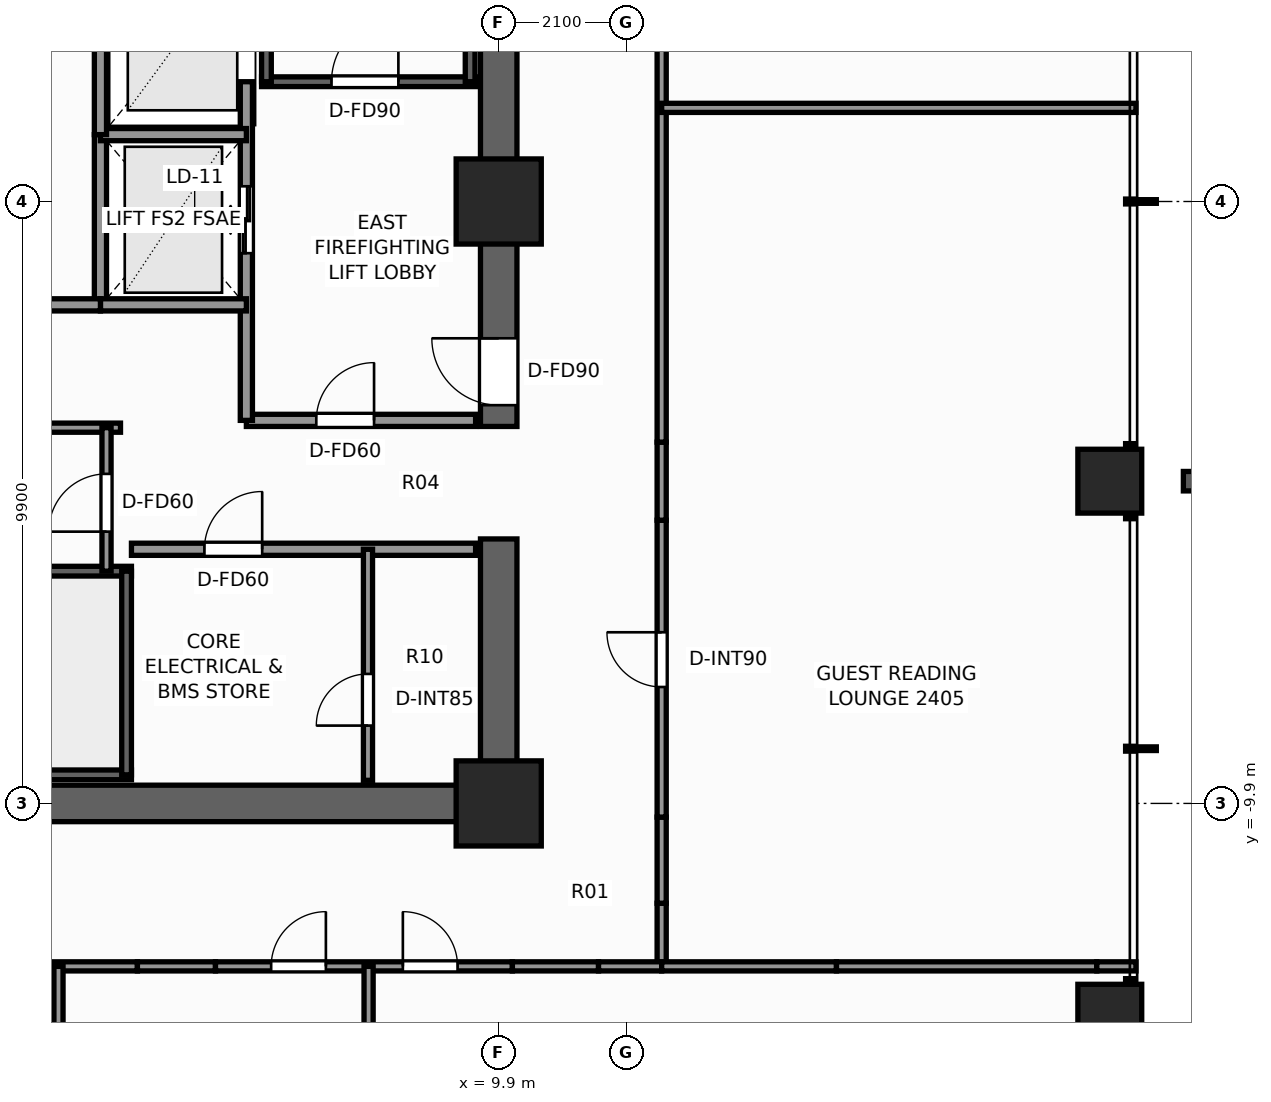
"""IFC4 building model, lengths in metres.
Left out: names, types, materials, properties, quantities, classifications, styles, units other than length and angle.
Written with IfcOpenShell. Run it as: python <this file> out.ifc"""

import sys

from ifc_helpers import new_model, si_unit, direction, frame, frame_2d, origin, origin_2d, place, context, subcontext, project, spatial, rectangle, extrude, element, fill, save


model = new_model("IFC4")
c1 = context("Model", 3, precision=1e-05, world=origin(), true_north=direction((0.0, 1.0)))
c2 = subcontext(c1, "Body", "Model", "MODEL_VIEW")
j1 = project(units=[si_unit("LENGTHUNIT", "METRE"), si_unit("PLANEANGLEUNIT", "RADIAN")], contexts=[c1])
p1 = place(None, origin())
s1 = spatial("IfcSite", under=j1, at=p1, CompositionType="ELEMENT")
p2 = place(p1, origin())
s2 = spatial("IfcBuilding", under=s1, at=p2, CompositionType="ELEMENT")
p3 = place(p2, frame((0.0, 0.0, 85.4)))
s3 = spatial("IfcBuildingStorey", under=s2, at=p3, CompositionType="ELEMENT", Elevation=85.4)
p4 = place(p3, frame((10.2, -9.9, 0.0), z_axis=(0.0, 0.0, 1.0), x_axis=(-1.0, 0.0, 0.0)))
e1 = element("IfcWall", 1, at=p4, inside=s3, PredefinedType="SHEAR", context=c2, shape_type="SweptSolid", body=[
    extrude(rectangle(XDim=12.06, YDim=0.6, at=frame_2d((6.03, 0.0))), origin(), (0.0, 0.0, 1.0), 3.3),
])
p5 = place(p3, frame((9.9, -9.6, 0.0), z_axis=(0.0, 0.0, 1.0), x_axis=(0.0, 1.0, 0.0)))
e2 = element("IfcWall", 2, at=p5, inside=s3, PredefinedType="SHEAR", context=c2, shape_type="SweptSolid", body=[
    extrude(rectangle(XDim=4.05, YDim=0.6, at=frame_2d((2.025, 0.0))), origin(), (0.0, 0.0, 1.0), 3.3),
])
p6 = place(p3, frame((9.9, -3.7, 0.0), z_axis=(0.0, 0.0, 1.0), x_axis=(0.0, 1.0, 0.0)))
e3 = element("IfcWall", 3, at=p6, inside=s3, PredefinedType="SHEAR", context=c2, shape_type="SweptSolid", body=[
    extrude(rectangle(XDim=13.3, YDim=0.6, at=frame_2d((6.65, 0.0))), origin(), (0.0, 0.0, 1.0), 3.3),
])
p7 = place(p6, frame((0.35, 0.0, 0.0)))
e4 = element("IfcOpeningElement", 4, at=p7, cuts=e3, PredefinedType="OPENING", context=c2, shape_type="SweptSolid", body=[
    extrude(rectangle(XDim=1.1, YDim=2.2, at=frame_2d((0.55, 1.1))), frame((0.0, 0.31, 0.0), z_axis=(0.0, -1.0, 0.0), x_axis=(1.0, 0.0, 0.0)), (0.0, 0.0, 1.0), 0.62),
])
for number, where, z_axis, x_axis in (
    (5, (9.9, -9.9, 0.0), (0.0, 0.0, 1.0), (1.0, 0.0, 0.0)),
    (6, (9.9, 0.0, 0.0), (0.0, 0.0, 1.0), (1.0, 0.0, 0.0)),
):
    element("IfcColumn", number, at=place(p3, frame(where, z_axis=z_axis, x_axis=x_axis)), inside=s3, PredefinedType="COLUMN", context=c2, shape_type="SweptSolid", body=[
        extrude(rectangle(XDim=1.4, YDim=1.4, at=origin_2d()), origin(), (0.0, 0.0, 1.0), 3.3),
    ])
for number, where, z_axis, x_axis in (
    (7, (19.95, -13.4, 0.0), (0.0, 0.0, 1.0), (1.0, 0.0, 0.0)),
    (8, (19.95, -4.6, 0.0), (0.0, 0.0, 1.0), (1.0, 0.0, 0.0)),
):
    element("IfcColumn", number, at=place(p3, frame(where, z_axis=z_axis, x_axis=x_axis)), inside=s3, PredefinedType="COLUMN", context=c2, shape_type="SweptSolid", body=[
        extrude(rectangle(XDim=1.05, YDim=1.05, at=origin_2d()), origin(), (0.0, 0.0, 1.0), 3.3),
    ])
p8 = place(p3, frame((6.0, 1.97, 0.0), z_axis=(0.0, 0.0, 1.0), x_axis=(1.0, 0.0, 0.0)))
e9 = element("IfcWall", 9, at=p8, inside=s3, PredefinedType="SHEAR", context=c2, shape_type="SweptSolid", body=[
    extrude(rectangle(XDim=3.52, YDim=0.16, at=frame_2d((1.76, 0.0))), origin(), (0.0, 0.0, 1.0), 3.3),
])
p9 = place(p8, frame((1.15, 0.0, 0.0)))
e10 = element("IfcOpeningElement", 10, at=p9, cuts=e9, PredefinedType="OPENING", context=c2, shape_type="SweptSolid", body=[
    extrude(rectangle(XDim=1.1, YDim=2.2, at=frame_2d((0.55, 1.1))), frame((0.0, 0.09, 0.0), z_axis=(0.0, -1.0, 0.0), x_axis=(1.0, 0.0, 0.0)), (0.0, 0.0, 1.0), 0.18),
])
for number, where, z_axis, x_axis in (
    (11, (6.08, 1.97, 0.0), (0.0, 0.0, 1.0), (0.0, 1.0, 0.0)),
    (12, (9.43, 1.97, 0.0), (0.0, 0.0, 1.0), (0.0, 1.0, 0.0)),
):
    element("IfcWall", number, at=place(p3, frame(where, z_axis=z_axis, x_axis=x_axis)), inside=s3, PredefinedType="SHEAR", context=c2, shape_type="SweptSolid", body=[
        extrude(rectangle(XDim=7.56, YDim=0.16, at=frame_2d((3.78, 0.0))), origin(), (0.0, 0.0, 1.0), 3.3),
    ])
p10 = place(p3, frame((3.86, -9.43, 0.0), z_axis=(0.0, 0.0, 1.0), x_axis=(-1.0, 0.0, 0.0)))
e13 = element("IfcWall", 13, at=p10, inside=s3, PredefinedType="SHEAR", context=c2, shape_type="SweptSolid", body=[
    extrude(rectangle(XDim=7.72, YDim=0.16, at=frame_2d((3.86, 0.0))), origin(), (0.0, 0.0, 1.0), 3.3),
])
p11 = place(p10, frame((6.01, 0.0, 0.0)))
e14 = element("IfcOpeningElement", 14, at=p11, cuts=e13, PredefinedType="OPENING", context=c2, shape_type="SweptSolid", body=[
    extrude(rectangle(XDim=1.1, YDim=2.2, at=frame_2d((0.55, 1.1))), frame((0.0, 0.09, 0.0), z_axis=(0.0, -1.0, 0.0), x_axis=(1.0, 0.0, 0.0)), (0.0, 0.0, 1.0), 0.18),
])
p12 = place(p3, frame((-3.86, -6.08, 0.0), z_axis=(0.0, 0.0, 1.0), x_axis=(1.0, 0.0, 0.0)))
e15 = element("IfcWall", 15, at=p12, inside=s3, PredefinedType="SHEAR", context=c2, shape_type="SweptSolid", body=[
    extrude(rectangle(XDim=7.72, YDim=0.16, at=frame_2d((3.86, 0.0))), origin(), (0.0, 0.0, 1.0), 3.3),
])
p13 = place(p3, frame((3.78, -9.43, 0.0), z_axis=(0.0, 0.0, 1.0), x_axis=(0.0, 1.0, 0.0)))
e16 = element("IfcWall", 16, at=p13, inside=s3, PredefinedType="SHEAR", context=c2, shape_type="SweptSolid", body=[
    extrude(rectangle(XDim=3.35, YDim=0.16, at=frame_2d((1.675, 0.0))), origin(), (0.0, 0.0, 1.0), 3.3),
])
p14 = place(p3, frame((5.75, -3.6, 0.0), z_axis=(0.0, 0.0, 1.0), x_axis=(1.0, 0.0, 0.0)))
e17 = element("IfcWall", 17, at=p14, inside=s3, PredefinedType="SOLIDWALL", context=c2, shape_type="SweptSolid", body=[
    extrude(rectangle(XDim=3.77, YDim=0.2, at=frame_2d((1.885, 0.0))), origin(), (0.0, 0.0, 1.0), 3.08),
])
p15 = place(p14, frame((1.15, 0.0, 0.0)))
e18 = element("IfcOpeningElement", 18, at=p15, cuts=e17, PredefinedType="OPENING", context=c2, shape_type="SweptSolid", body=[
    extrude(rectangle(XDim=0.95, YDim=2.06, at=frame_2d((0.475, 1.03))), frame((0.0, 0.11, 0.0), z_axis=(0.0, -1.0, 0.0), x_axis=(1.0, 0.0, 0.0)), (0.0, 0.0, 1.0), 0.22),
])
p16 = place(p3, frame((5.75, -3.6, 0.0), z_axis=(0.0, 0.0, 1.0), x_axis=(0.0, 1.0, 0.0)))
e19 = element("IfcWall", 19, at=p16, inside=s3, PredefinedType="SOLIDWALL", context=c2, shape_type="SweptSolid", body=[
    extrude(rectangle(XDim=5.57, YDim=0.2, at=frame_2d((2.785, 0.0))), origin(), (0.0, 0.0, 1.0), 3.08),
])
p17 = place(p16, frame((2.75, 0.0, 0.0)))
e20 = element("IfcOpeningElement", 20, at=p17, cuts=e19, PredefinedType="OPENING", context=c2, shape_type="SweptSolid", body=[
    extrude(rectangle(XDim=1.1, YDim=2.2, at=frame_2d((0.55, 1.1))), frame((0.0, 0.11, 0.0), z_axis=(0.0, -1.0, 0.0), x_axis=(1.0, 0.0, 0.0)), (0.0, 0.0, 1.0), 0.22),
])
p18 = place(p3, frame((3.35, -1.7, 0.0), z_axis=(0.0, 0.0, 1.0), x_axis=(0.0, 1.0, 0.0)))
e21 = element("IfcWall", 21, at=p18, inside=s3, PredefinedType="SOLIDWALL", context=c2, shape_type="SweptSolid", body=[
    extrude(rectangle(XDim=2.8, YDim=0.2, at=frame_2d((1.4, 0.0))), origin(), (0.0, 0.0, 1.0), 3.08),
])
for number, where, z_axis, x_axis in (
    (22, (3.35, -1.7, 0.0), (0.0, 0.0, 1.0), (1.0, 0.0, 0.0)),
    (23, (3.35, 1.1, 0.0), (0.0, 0.0, 1.0), (1.0, 0.0, 0.0)),
):
    element("IfcWall", number, at=place(p3, frame(where, z_axis=z_axis, x_axis=x_axis)), inside=s3, PredefinedType="SOLIDWALL", context=c2, shape_type="SweptSolid", body=[
        extrude(rectangle(XDim=2.4, YDim=0.2, at=frame_2d((1.2, 0.0))), origin(), (0.0, 0.0, 1.0), 3.08),
    ])
p19 = place(p3, frame((3.86, -5.72, 0.0), z_axis=(0.0, 0.0, 1.0), x_axis=(1.0, 0.0, 0.0)))
e24 = element("IfcWall", 24, at=p19, inside=s3, PredefinedType="SOLIDWALL", context=c2, shape_type="SweptSolid", body=[
    extrude(rectangle(XDim=5.66, YDim=0.2, at=frame_2d((2.83, 0.0))), origin(), (0.0, 0.0, 1.0), 3.08),
])
p20 = place(p19, frame((1.2, 0.0, 0.0)))
e25 = element("IfcOpeningElement", 25, at=p20, cuts=e24, PredefinedType="OPENING", context=c2, shape_type="SweptSolid", body=[
    extrude(rectangle(XDim=0.95, YDim=2.06, at=frame_2d((0.475, 1.03))), frame((0.0, 0.11, 0.0), z_axis=(0.0, -1.0, 0.0), x_axis=(1.0, 0.0, 0.0)), (0.0, 0.0, 1.0), 0.22),
])
p21 = place(p3, frame((7.75, -9.52, 0.0), z_axis=(0.0, 0.0, 1.0), x_axis=(0.0, 1.0, 0.0)))
e26 = element("IfcWall", 26, at=p21, inside=s3, PredefinedType="PARTITIONING", context=c2, shape_type="SweptSolid", body=[
    extrude(rectangle(XDim=3.8, YDim=0.15, at=frame_2d((1.9, 0.0))), origin(), (0.0, 0.0, 1.0), 3.08),
])
p22 = place(p21, frame((0.9, 0.0, 0.0)))
e27 = element("IfcOpeningElement", 27, at=p22, cuts=e26, PredefinedType="OPENING", context=c2, shape_type="SweptSolid", body=[
    extrude(rectangle(XDim=0.85, YDim=2.03, at=frame_2d((0.425, 1.015))), frame((0.0, 0.085, 0.0), z_axis=(0.0, -1.0, 0.0), x_axis=(1.0, 0.0, 0.0)), (0.0, 0.0, 1.0), 0.17),
])
p23 = place(p3, frame((-3.35, -1.7, 0.0), z_axis=(0.0, 0.0, 1.0), x_axis=(1.0, 0.0, 0.0)))
e28 = element("IfcWall", 28, at=p23, inside=s3, PredefinedType="SOLIDWALL", context=c2, shape_type="SweptSolid", body=[
    extrude(rectangle(XDim=6.7, YDim=0.2, at=frame_2d((3.35, 0.0))), origin(), (0.0, 0.0, 1.0), 3.08),
])
p24 = place(p3, frame((3.35, 1.1, 0.0), z_axis=(0.0, 0.0, 1.0), x_axis=(0.0, 1.0, 0.0)))
e29 = element("IfcWall", 29, at=p24, inside=s3, PredefinedType="SOLIDWALL", context=c2, shape_type="SweptSolid", body=[
    extrude(rectangle(XDim=3.2, YDim=0.2, at=frame_2d((1.6, 0.0))), origin(), (0.0, 0.0, 1.0), 3.08),
])
p25 = place(p3, frame((-3.68, -3.72, 0.0), z_axis=(0.0, 0.0, 1.0), x_axis=(1.0, 0.0, 0.0)))
e30 = element("IfcWall", 30, at=p25, inside=s3, PredefinedType="PARTITIONING", context=c2, shape_type="SweptSolid", body=[
    extrude(rectangle(XDim=7.36, YDim=0.15, at=frame_2d((3.68, 0.0))), origin(), (0.0, 0.0, 1.0), 3.08),
])
p26 = place(p3, frame((3.45, -6.08, 0.0), z_axis=(0.0, 0.0, 1.0), x_axis=(0.0, 1.0, 0.0)))
e31 = element("IfcWall", 31, at=p26, inside=s3, PredefinedType="PARTITIONING", context=c2, shape_type="SweptSolid", body=[
    extrude(rectangle(XDim=2.36, YDim=0.15, at=frame_2d((1.18, 0.0))), origin(), (0.0, 0.0, 1.0), 3.08),
])
p27 = place(p26, frame((0.65, 0.0, 0.0)))
e32 = element("IfcOpeningElement", 32, at=p27, cuts=e31, PredefinedType="OPENING", context=c2, shape_type="SweptSolid", body=[
    extrude(rectangle(XDim=0.95, YDim=2.06, at=frame_2d((0.475, 1.03))), frame((0.0, 0.085, 0.0), z_axis=(0.0, -1.0, 0.0), x_axis=(1.0, 0.0, 0.0)), (0.0, 0.0, 1.0), 0.17),
])
p28 = place(p3, frame((12.58, -12.58, 0.0), z_axis=(0.0, 0.0, 1.0), x_axis=(0.0, 1.0, 0.0)))
e33 = element("IfcWall", 33, at=p28, inside=s3, PredefinedType="PARTITIONING", context=c2, shape_type="SweptSolid", body=[
    extrude(rectangle(XDim=1.038, YDim=0.15, at=frame_2d((0.519, 0.0))), origin(), (0.0, 0.0, 1.0), 3.08),
])
p29 = place(p3, frame((12.58, -11.542, 0.0), z_axis=(0.0, 0.0, 1.0), x_axis=(0.0, 1.0, 0.0)))
e34 = element("IfcWall", 34, at=p29, inside=s3, PredefinedType="PARTITIONING", context=c2, shape_type="SweptSolid", body=[
    extrude(rectangle(XDim=1.417, YDim=0.15, at=frame_2d((0.708, 0.0))), origin(), (0.0, 0.0, 1.0), 1.265),
])
p30 = place(p3, frame((12.58, -10.125, 0.0), z_axis=(0.0, 0.0, 1.0), x_axis=(0.0, 1.0, 0.0)))
e35 = element("IfcWall", 35, at=p30, inside=s3, PredefinedType="PARTITIONING", context=c2, shape_type="SweptSolid", body=[
    extrude(rectangle(XDim=4.883, YDim=0.15, at=frame_2d((2.441, 0.0))), origin(), (0.0, 0.0, 1.0), 3.08),
])
p31 = place(p30, frame((2.14, 0.0, 0.0)))
e36 = element("IfcOpeningElement", 36, at=p31, cuts=e35, PredefinedType="OPENING", context=c2, shape_type="SweptSolid", body=[
    extrude(rectangle(XDim=0.9, YDim=2.06, at=frame_2d((0.45, 1.03))), frame((0.0, 0.085, 0.0), z_axis=(0.0, -1.0, 0.0), x_axis=(1.0, 0.0, 0.0)), (0.0, 0.0, 1.0), 0.17),
])
p32 = place(p3, frame((12.58, -5.242, 0.0), z_axis=(0.0, 0.0, 1.0), x_axis=(0.0, 1.0, 0.0)))
e37 = element("IfcWall", 37, at=p32, inside=s3, PredefinedType="PARTITIONING", context=c2, shape_type="SweptSolid", body=[
    extrude(rectangle(XDim=1.284, YDim=0.15, at=frame_2d((0.642, 0.0))), origin(), (0.0, 0.0, 1.0), 1.265),
])
p33 = place(p3, frame((12.58, -3.958, 0.0), z_axis=(0.0, 0.0, 1.0), x_axis=(0.0, 1.0, 0.0)))
e38 = element("IfcWall", 38, at=p33, inside=s3, PredefinedType="PARTITIONING", context=c2, shape_type="SweptSolid", body=[
    extrude(rectangle(XDim=7.916, YDim=0.15, at=frame_2d((3.958, 0.0))), origin(), (0.0, 0.0, 1.0), 2.369),
])
p34 = place(p3, frame((-3.65, -12.58, 0.0), z_axis=(0.0, 0.0, 1.0), x_axis=(1.0, 0.0, 0.0)))
e39 = element("IfcWall", 39, at=p34, inside=s3, PredefinedType="PARTITIONING", context=c2, shape_type="SweptSolid", body=[
    extrude(rectangle(XDim=7.608, YDim=0.15, at=frame_2d((3.804, 0.0))), origin(), (0.0, 0.0, 1.0), 2.605),
])
p35 = place(p34, frame((0.784, 0.0, 0.0)))
e40 = element("IfcOpeningElement", 40, at=p35, cuts=e39, PredefinedType="OPENING", context=c2, shape_type="SweptSolid", body=[
    extrude(rectangle(XDim=0.9, YDim=2.06, at=frame_2d((0.45, 1.03))), frame((0.0, 0.085, 0.0), z_axis=(0.0, -1.0, 0.0), x_axis=(1.0, 0.0, 0.0)), (0.0, 0.0, 1.0), 0.17),
])
p36 = place(p34, frame((4.418, 0.0, 0.0)))
e41 = element("IfcOpeningElement", 41, at=p36, cuts=e39, PredefinedType="OPENING", context=c2, shape_type="SweptSolid", body=[
    extrude(rectangle(XDim=0.95, YDim=2.06, at=frame_2d((0.475, 1.03))), frame((0.0, 0.085, 0.0), z_axis=(0.0, -1.0, 0.0), x_axis=(1.0, 0.0, 0.0)), (0.0, 0.0, 1.0), 0.17),
])
p37 = place(p3, frame((3.958, -12.58, 0.0), z_axis=(0.0, 0.0, 1.0), x_axis=(1.0, 0.0, 0.0)))
e42 = element("IfcWall", 42, at=p37, inside=s3, PredefinedType="PARTITIONING", context=c2, shape_type="SweptSolid", body=[
    extrude(rectangle(XDim=1.284, YDim=0.15, at=frame_2d((0.642, 0.0))), origin(), (0.0, 0.0, 1.0), 1.265),
])
p38 = place(p3, frame((5.242, -12.58, 0.0), z_axis=(0.0, 0.0, 1.0), x_axis=(1.0, 0.0, 0.0)))
e43 = element("IfcWall", 43, at=p38, inside=s3, PredefinedType="PARTITIONING", context=c2, shape_type="SweptSolid", body=[
    extrude(rectangle(XDim=4.883, YDim=0.15, at=frame_2d((2.441, 0.0))), origin(), (0.0, 0.0, 1.0), 3.08),
])
p39 = place(p38, frame((0.916, 0.0, 0.0)))
e44 = element("IfcOpeningElement", 44, at=p39, cuts=e43, PredefinedType="OPENING", context=c2, shape_type="SweptSolid", body=[
    extrude(rectangle(XDim=0.9, YDim=2.06, at=frame_2d((0.45, 1.03))), frame((0.0, 0.085, 0.0), z_axis=(0.0, -1.0, 0.0), x_axis=(1.0, 0.0, 0.0)), (0.0, 0.0, 1.0), 0.17),
])
p40 = place(p38, frame((3.082, 0.0, 0.0)))
e45 = element("IfcOpeningElement", 45, at=p40, cuts=e43, PredefinedType="OPENING", context=c2, shape_type="SweptSolid", body=[
    extrude(rectangle(XDim=0.9, YDim=2.06, at=frame_2d((0.45, 1.03))), frame((0.0, 0.085, 0.0), z_axis=(0.0, -1.0, 0.0), x_axis=(1.0, 0.0, 0.0)), (0.0, 0.0, 1.0), 0.17),
])
p41 = place(p3, frame((10.125, -12.58, 0.0), z_axis=(0.0, 0.0, 1.0), x_axis=(1.0, 0.0, 0.0)))
e46 = element("IfcWall", 46, at=p41, inside=s3, PredefinedType="PARTITIONING", context=c2, shape_type="SweptSolid", body=[
    extrude(rectangle(XDim=1.417, YDim=0.15, at=frame_2d((0.708, 0.0))), origin(), (0.0, 0.0, 1.0), 1.265),
])
p42 = place(p3, frame((11.542, -12.58, 0.0), z_axis=(0.0, 0.0, 1.0), x_axis=(1.0, 0.0, 0.0)))
e47 = element("IfcWall", 47, at=p42, inside=s3, PredefinedType="PARTITIONING", context=c2, shape_type="SweptSolid", body=[
    extrude(rectangle(XDim=1.038, YDim=0.15, at=frame_2d((0.519, 0.0))), origin(), (0.0, 0.0, 1.0), 3.08),
])
p43 = place(p3, frame((12.58, -12.58, 0.0), z_axis=(0.0, 0.0, 1.0), x_axis=(1.0, 0.0, 0.0)))
e48 = element("IfcWall", 48, at=p43, inside=s3, PredefinedType="PARTITIONING", context=c2, shape_type="SweptSolid", body=[
    extrude(rectangle(XDim=2.875, YDim=0.15, at=frame_2d((1.438, 0.0))), origin(), (0.0, 0.0, 1.0), 3.08),
])
p44 = place(p3, frame((15.455, -12.58, 0.0), z_axis=(0.0, 0.0, 1.0), x_axis=(1.0, 0.0, 0.0)))
e49 = element("IfcWall", 49, at=p44, inside=s3, PredefinedType="PARTITIONING", context=c2, shape_type="SweptSolid", body=[
    extrude(rectangle(XDim=4.281, YDim=0.15, at=frame_2d((2.141, 0.0))), origin(), (0.0, 0.0, 1.0), 1.265),
])
p45 = place(p3, frame((19.736, -12.58, 0.0), z_axis=(0.0, 0.0, 1.0), x_axis=(1.0, 0.0, 0.0)))
e50 = element("IfcWall", 50, at=p45, inside=s3, PredefinedType="PARTITIONING", context=c2, shape_type="SweptSolid", body=[
    extrude(rectangle(XDim=0.644, YDim=0.15, at=frame_2d((0.322, 0.0))), origin(), (0.0, 0.0, 1.0), 2.449),
])
for number, where, z_axis, x_axis in (
    (51, (12.58, 1.54, 0.0), (0.0, 0.0, 1.0), (1.0, 0.0, 0.0)),
    (52, (2.66, -20.38, 0.0), (0.0, 0.0, 1.0), (0.0, 1.0, 0.0)),
    (53, (7.76, -20.38, 0.0), (0.0, 0.0, 1.0), (0.0, 1.0, 0.0)),
):
    element("IfcWall", number, at=place(p3, frame(where, z_axis=z_axis, x_axis=x_axis)), inside=s3, PredefinedType="PARTITIONING", context=c2, shape_type="SweptSolid", body=[
        extrude(rectangle(XDim=7.8, YDim=0.15, at=frame_2d((3.9, 0.0))), origin(), (0.0, 0.0, 1.0), 2.449),
    ])
p46 = place(p9, origin())
e54 = element("IfcDoor", 54, at=p46, inside=s3, OperationType="SINGLE_SWING_RIGHT", PredefinedType="DOOR", context=c2, shape_type="SweptSolid", body=[
    extrude(rectangle(XDim=1.1, YDim=2.2, at=frame_2d((0.55, 1.1))), frame((0.0, 0.025, 0.0), z_axis=(0.0, -1.0, 0.0), x_axis=(1.0, 0.0, 0.0)), (0.0, 0.0, 1.0), 0.05),
])
fill(e10, e54)
p47 = place(p7, origin())
e55 = element("IfcDoor", 55, at=p47, inside=s3, OperationType="SINGLE_SWING_RIGHT", PredefinedType="DOOR", context=c2, shape_type="SweptSolid", body=[
    extrude(rectangle(XDim=1.1, YDim=2.2, at=frame_2d((0.55, 1.1))), frame((0.0, 0.025, 0.0), z_axis=(0.0, -1.0, 0.0), x_axis=(1.0, 0.0, 0.0)), (0.0, 0.0, 1.0), 0.05),
])
fill(e4, e55)
p48 = place(p17, origin())
e56 = element("IfcDoor", 56, at=p48, inside=s3, OperationType="DOUBLE_DOOR_SLIDING", PredefinedType="DOOR", context=c2, shape_type="SweptSolid", body=[
    extrude(rectangle(XDim=1.1, YDim=2.2, at=frame_2d((0.55, 1.1))), frame((0.0, 0.025, 0.0), z_axis=(0.0, -1.0, 0.0), x_axis=(1.0, 0.0, 0.0)), (0.0, 0.0, 1.0), 0.05),
])
fill(e20, e56)
p49 = place(p20, origin())
e57 = element("IfcDoor", 57, at=p49, inside=s3, OperationType="SINGLE_SWING_RIGHT", PredefinedType="DOOR", context=c2, shape_type="SweptSolid", body=[
    extrude(rectangle(XDim=0.95, YDim=2.06, at=frame_2d((0.475, 1.03))), frame((0.0, 0.025, 0.0), z_axis=(0.0, -1.0, 0.0), x_axis=(1.0, 0.0, 0.0)), (0.0, 0.0, 1.0), 0.05),
])
fill(e25, e57)
p50 = place(p22, origin())
e58 = element("IfcDoor", 58, at=p50, inside=s3, OperationType="SINGLE_SWING_LEFT", PredefinedType="DOOR", context=c2, shape_type="SweptSolid", body=[
    extrude(rectangle(XDim=0.85, YDim=2.03, at=frame_2d((0.425, 1.015))), frame((0.0, 0.025, 0.0), z_axis=(0.0, -1.0, 0.0), x_axis=(1.0, 0.0, 0.0)), (0.0, 0.0, 1.0), 0.05),
])
fill(e27, e58)
p51 = place(p15, origin())
e59 = element("IfcDoor", 59, at=p51, inside=s3, OperationType="SINGLE_SWING_RIGHT", PredefinedType="DOOR", context=c2, shape_type="SweptSolid", body=[
    extrude(rectangle(XDim=0.95, YDim=2.06, at=frame_2d((0.475, 1.03))), frame((0.0, 0.025, 0.0), z_axis=(0.0, -1.0, 0.0), x_axis=(1.0, 0.0, 0.0)), (0.0, 0.0, 1.0), 0.05),
])
fill(e18, e59)
p52 = place(p27, origin())
e60 = element("IfcDoor", 60, at=p52, inside=s3, OperationType="SINGLE_SWING_LEFT", PredefinedType="DOOR", context=c2, shape_type="SweptSolid", body=[
    extrude(rectangle(XDim=0.95, YDim=2.06, at=frame_2d((0.475, 1.03))), frame((0.0, 0.025, 0.0), z_axis=(0.0, -1.0, 0.0), x_axis=(1.0, 0.0, 0.0)), (0.0, 0.0, 1.0), 0.05),
])
fill(e32, e60)
p53 = place(p31, origin())
e61 = element("IfcDoor", 61, at=p53, inside=s3, OperationType="SINGLE_SWING_RIGHT", PredefinedType="DOOR", context=c2, shape_type="SweptSolid", body=[
    extrude(rectangle(XDim=0.9, YDim=2.06, at=frame_2d((0.45, 1.03))), frame((0.0, 0.025, 0.0), z_axis=(0.0, -1.0, 0.0), x_axis=(1.0, 0.0, 0.0)), (0.0, 0.0, 1.0), 0.05),
])
fill(e36, e61)
p54 = place(p39, origin())
e62 = element("IfcDoor", 62, at=p54, inside=s3, OperationType="SINGLE_SWING_RIGHT", PredefinedType="DOOR", context=c2, shape_type="SweptSolid", body=[
    extrude(rectangle(XDim=0.9, YDim=2.06, at=frame_2d((0.45, 1.03))), frame((0.0, 0.025, 0.0), z_axis=(0.0, -1.0, 0.0), x_axis=(1.0, 0.0, 0.0)), (0.0, 0.0, 1.0), 0.05),
])
fill(e44, e62)
p55 = place(p40, origin())
e63 = element("IfcDoor", 63, at=p55, inside=s3, OperationType="SINGLE_SWING_LEFT", PredefinedType="DOOR", context=c2, shape_type="SweptSolid", body=[
    extrude(rectangle(XDim=0.9, YDim=2.06, at=frame_2d((0.45, 1.03))), frame((0.0, 0.025, 0.0), z_axis=(0.0, -1.0, 0.0), x_axis=(1.0, 0.0, 0.0)), (0.0, 0.0, 1.0), 0.05),
])
fill(e45, e63)
save(model, sys.argv[1])
